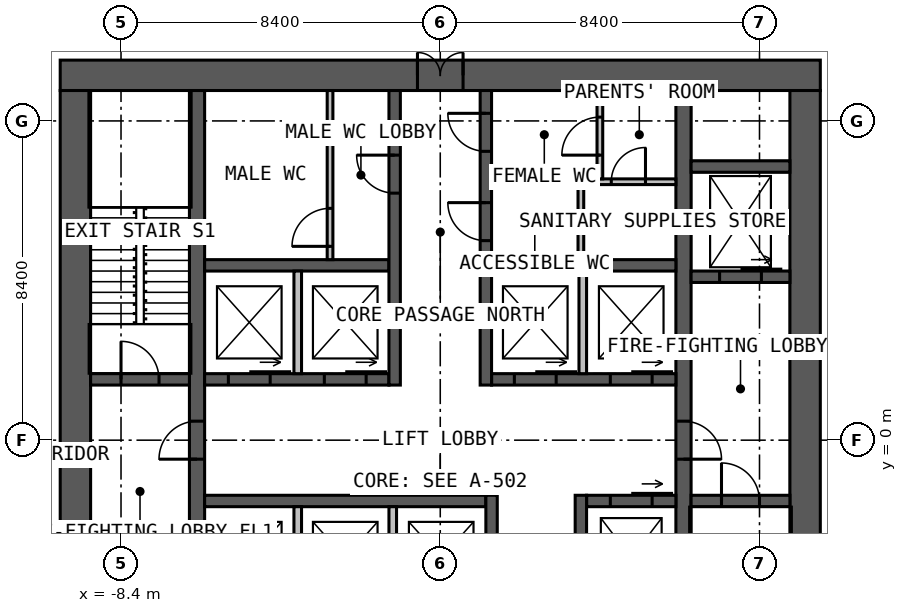
"""IFC4 building model, lengths in metres.
Left out: names, types, materials, properties, quantities, classifications, styles, units other than length and angle.
Written with IfcOpenShell. Run it as: python <this file> out.ifc"""

import sys

from ifc_helpers import new_model, si_unit, direction, frame, frame_2d, origin, place, context, subcontext, project, spatial, rectangle, extrude, element, fill, save


model = new_model("IFC4")
c1 = context("Model", 3, precision=1e-05, world=origin(), true_north=direction((0.0, 1.0)))
c2 = subcontext(c1, "Body", "Model", "MODEL_VIEW")
j1 = project(units=[si_unit("LENGTHUNIT", "METRE"), si_unit("PLANEANGLEUNIT", "RADIAN")], contexts=[c1])
p1 = place(None, origin())
s1 = spatial("IfcSite", under=j1, at=p1, CompositionType="ELEMENT")
p2 = place(p1, origin())
s2 = spatial("IfcBuilding", under=s1, at=p2, CompositionType="ELEMENT")
p3 = place(p2, frame((0.0, 0.0, 49.0)))
s3 = spatial("IfcBuildingStorey", under=s2, at=p3, CompositionType="ELEMENT", Elevation=49.0)
p4 = place(p3, frame((-10.0, 9.6, 0.0), z_axis=(0.0, 0.0, 1.0), x_axis=(1.0, 0.0, 0.0)))
e1 = element("IfcWall", 1, at=p4, inside=s3, PredefinedType="SOLIDWALL", context=c2, shape_type="SweptSolid", body=[
    extrude(rectangle(XDim=20.0, YDim=0.8, at=frame_2d((10.0, 0.0))), origin(), (0.0, 0.0, 1.0), 4.0),
])
p5 = place(p4, frame((9.4, 0.0, 0.0)))
e2 = element("IfcOpeningElement", 2, at=p5, cuts=e1, PredefinedType="OPENING", context=c2, shape_type="SweptSolid", body=[
    extrude(rectangle(XDim=1.2, YDim=2.2, at=frame_2d((0.6, 1.1))), frame((0.0, 0.41, 0.0), z_axis=(0.0, -1.0, 0.0), x_axis=(1.0, 0.0, 0.0)), (0.0, 0.0, 1.0), 0.82),
])
for number, where, z_axis, x_axis in (
    (3, (9.6, -9.2, 0.0), (0.0, 0.0, 1.0), (0.0, 1.0, 0.0)),
    (4, (-9.6, 9.2, 0.0), (0.0, 0.0, 1.0), (0.0, -1.0, 0.0)),
):
    element("IfcWall", number, at=place(p3, frame(where, z_axis=z_axis, x_axis=x_axis)), inside=s3, PredefinedType="SOLIDWALL", context=c2, shape_type="SweptSolid", body=[
        extrude(rectangle(XDim=18.4, YDim=0.8, at=frame_2d((9.2, 0.0))), origin(), (0.0, 0.0, 1.0), 4.0),
    ])
p6 = place(p3, frame((-6.4, -9.2, 0.0), z_axis=(0.0, 0.0, 1.0), x_axis=(0.0, 1.0, 0.0)))
e5 = element("IfcWall", 5, at=p6, inside=s3, PredefinedType="SOLIDWALL", context=c2, shape_type="SweptSolid", body=[
    extrude(rectangle(XDim=18.4, YDim=0.4, at=frame_2d((9.2, 0.0))), origin(), (0.0, 0.0, 1.0), 4.0),
])
p7 = place(p6, frame((8.7, 0.0, 0.0)))
e6 = element("IfcOpeningElement", 6, at=p7, cuts=e5, PredefinedType="OPENING", context=c2, shape_type="SweptSolid", body=[
    extrude(rectangle(XDim=1.0, YDim=2.2, at=frame_2d((0.5, 1.1))), frame((0.0, 0.21, 0.0), z_axis=(0.0, -1.0, 0.0), x_axis=(1.0, 0.0, 0.0)), (0.0, 0.0, 1.0), 0.42),
])
p8 = place(p3, frame((6.4, 9.2, 0.0), z_axis=(0.0, 0.0, 1.0), x_axis=(0.0, -1.0, 0.0)))
e7 = element("IfcWall", 7, at=p8, inside=s3, PredefinedType="SOLIDWALL", context=c2, shape_type="SweptSolid", body=[
    extrude(rectangle(XDim=18.4, YDim=0.4, at=frame_2d((9.2, 0.0))), origin(), (0.0, 0.0, 1.0), 4.0),
])
p9 = place(p8, frame((8.7, 0.0, 0.0)))
e8 = element("IfcOpeningElement", 8, at=p9, cuts=e7, PredefinedType="OPENING", context=c2, shape_type="SweptSolid", body=[
    extrude(rectangle(XDim=1.0, YDim=2.2, at=frame_2d((0.5, 1.1))), frame((0.0, 0.21, 0.0), z_axis=(0.0, -1.0, 0.0), x_axis=(1.0, 0.0, 0.0)), (0.0, 0.0, 1.0), 0.42),
])
p10 = place(p3, frame((-6.2, 1.6, 0.0), z_axis=(0.0, 0.0, 1.0), x_axis=(1.0, 0.0, 0.0)))
e9 = element("IfcWall", 9, at=p10, inside=s3, PredefinedType="SOLIDWALL", context=c2, shape_type="SweptSolid", body=[
    extrude(rectangle(XDim=4.85, YDim=0.3, at=frame_2d((2.425, 0.0))), origin(), (0.0, 0.0, 1.0), 4.0),
])
p11 = place(p10, frame((0.625, 0.0, 0.0)))
e10 = element("IfcOpeningElement", 10, at=p11, cuts=e9, PredefinedType="OPENING", context=c2, shape_type="SweptSolid", body=[
    extrude(rectangle(XDim=1.1, YDim=2.2, at=frame_2d((0.55, 1.1))), frame((0.0, 0.16, 0.0), z_axis=(0.0, -1.0, 0.0), x_axis=(1.0, 0.0, 0.0)), (0.0, 0.0, 1.0), 0.32),
])
p12 = place(p10, frame((3.15, 0.0, 0.0)))
e11 = element("IfcOpeningElement", 11, at=p12, cuts=e9, PredefinedType="OPENING", context=c2, shape_type="SweptSolid", body=[
    extrude(rectangle(XDim=1.1, YDim=2.2, at=frame_2d((0.55, 1.1))), frame((0.0, 0.16, 0.0), z_axis=(0.0, -1.0, 0.0), x_axis=(1.0, 0.0, 0.0)), (0.0, 0.0, 1.0), 0.32),
])
p13 = place(p3, frame((1.35, 1.6, 0.0), z_axis=(0.0, 0.0, 1.0), x_axis=(1.0, 0.0, 0.0)))
e12 = element("IfcWall", 12, at=p13, inside=s3, PredefinedType="SOLIDWALL", context=c2, shape_type="SweptSolid", body=[
    extrude(rectangle(XDim=4.85, YDim=0.3, at=frame_2d((2.425, 0.0))), origin(), (0.0, 0.0, 1.0), 4.0),
])
p14 = place(p13, frame((0.6, 0.0, 0.0)))
e13 = element("IfcOpeningElement", 13, at=p14, cuts=e12, PredefinedType="OPENING", context=c2, shape_type="SweptSolid", body=[
    extrude(rectangle(XDim=1.1, YDim=2.2, at=frame_2d((0.55, 1.1))), frame((0.0, 0.16, 0.0), z_axis=(0.0, -1.0, 0.0), x_axis=(1.0, 0.0, 0.0)), (0.0, 0.0, 1.0), 0.32),
])
p15 = place(p13, frame((3.125, 0.0, 0.0)))
e14 = element("IfcOpeningElement", 14, at=p15, cuts=e12, PredefinedType="OPENING", context=c2, shape_type="SweptSolid", body=[
    extrude(rectangle(XDim=1.1, YDim=2.2, at=frame_2d((0.55, 1.1))), frame((0.0, 0.16, 0.0), z_axis=(0.0, -1.0, 0.0), x_axis=(1.0, 0.0, 0.0)), (0.0, 0.0, 1.0), 0.32),
])
for number, where, z_axis, x_axis in (
    (15, (-6.2, 4.6, 0.0), (0.0, 0.0, 1.0), (1.0, 0.0, 0.0)),
    (16, (1.35, 4.6, 0.0), (0.0, 0.0, 1.0), (1.0, 0.0, 0.0)),
):
    element("IfcWall", number, at=place(p3, frame(where, z_axis=z_axis, x_axis=x_axis)), inside=s3, PredefinedType="SOLIDWALL", context=c2, shape_type="SweptSolid", body=[
        extrude(rectangle(XDim=4.85, YDim=0.3, at=frame_2d((2.425, 0.0))), origin(), (0.0, 0.0, 1.0), 4.0),
    ])
p16 = place(p3, frame((-1.2, 1.45, 0.0), z_axis=(0.0, 0.0, 1.0), x_axis=(0.0, 1.0, 0.0)))
e17 = element("IfcWall", 17, at=p16, inside=s3, PredefinedType="SOLIDWALL", context=c2, shape_type="SweptSolid", body=[
    extrude(rectangle(XDim=7.75, YDim=0.3, at=frame_2d((3.875, 0.0))), origin(), (0.0, 0.0, 1.0), 4.0),
])
p17 = place(p16, frame((5.05, 0.0, 0.0)))
e18 = element("IfcOpeningElement", 18, at=p17, cuts=e17, PredefinedType="OPENING", context=c2, shape_type="SweptSolid", body=[
    extrude(rectangle(XDim=1.0, YDim=2.2, at=frame_2d((0.5, 1.1))), frame((0.0, 0.16, 0.0), z_axis=(0.0, -1.0, 0.0), x_axis=(1.0, 0.0, 0.0)), (0.0, 0.0, 1.0), 0.32),
])
p18 = place(p3, frame((1.2, 1.45, 0.0), z_axis=(0.0, 0.0, 1.0), x_axis=(0.0, 1.0, 0.0)))
e19 = element("IfcWall", 19, at=p18, inside=s3, PredefinedType="SOLIDWALL", context=c2, shape_type="SweptSolid", body=[
    extrude(rectangle(XDim=7.75, YDim=0.3, at=frame_2d((3.875, 0.0))), origin(), (0.0, 0.0, 1.0), 4.0),
])
p19 = place(p18, frame((3.8, 0.0, 0.0)))
e20 = element("IfcOpeningElement", 20, at=p19, cuts=e19, PredefinedType="OPENING", context=c2, shape_type="SweptSolid", body=[
    extrude(rectangle(XDim=1.0, YDim=2.2, at=frame_2d((0.5, 1.1))), frame((0.0, 0.16, 0.0), z_axis=(0.0, -1.0, 0.0), x_axis=(1.0, 0.0, 0.0)), (0.0, 0.0, 1.0), 0.32),
])
p20 = place(p18, frame((6.15, 0.0, 0.0)))
e21 = element("IfcOpeningElement", 21, at=p20, cuts=e19, PredefinedType="OPENING", context=c2, shape_type="SweptSolid", body=[
    extrude(rectangle(XDim=1.0, YDim=2.2, at=frame_2d((0.5, 1.1))), frame((0.0, 0.16, 0.0), z_axis=(0.0, -1.0, 0.0), x_axis=(1.0, 0.0, 0.0)), (0.0, 0.0, 1.0), 0.32),
])
p21 = place(p3, frame((-6.2, -1.6, 0.0), z_axis=(0.0, 0.0, 1.0), x_axis=(1.0, 0.0, 0.0)))
e22 = element("IfcWall", 22, at=p21, inside=s3, PredefinedType="SOLIDWALL", context=c2, shape_type="SweptSolid", body=[
    extrude(rectangle(XDim=7.4, YDim=0.3, at=frame_2d((3.7, 0.0))), origin(), (0.0, 0.0, 1.0), 4.0),
])
p22 = place(p3, frame((3.85, -1.6, 0.0), z_axis=(0.0, 0.0, 1.0), x_axis=(1.0, 0.0, 0.0)))
e23 = element("IfcWall", 23, at=p22, inside=s3, PredefinedType="SOLIDWALL", context=c2, shape_type="SweptSolid", body=[
    extrude(rectangle(XDim=2.35, YDim=0.3, at=frame_2d((1.175, 0.0))), origin(), (0.0, 0.0, 1.0), 4.0),
])
p23 = place(p22, frame((0.625, 0.0, 0.0)))
e24 = element("IfcOpeningElement", 24, at=p23, cuts=e23, PredefinedType="OPENING", context=c2, shape_type="SweptSolid", body=[
    extrude(rectangle(XDim=1.1, YDim=2.2, at=frame_2d((0.55, 1.1))), frame((0.0, 0.16, 0.0), z_axis=(0.0, -1.0, 0.0), x_axis=(1.0, 0.0, 0.0)), (0.0, 0.0, 1.0), 0.32),
])
p24 = place(p3, frame((1.35, -1.45, 0.0), z_axis=(0.0, 0.0, 1.0), x_axis=(0.0, -1.0, 0.0)))
e25 = element("IfcWall", 25, at=p24, inside=s3, PredefinedType="SOLIDWALL", context=c2, shape_type="SweptSolid", body=[
    extrude(rectangle(XDim=7.75, YDim=0.3, at=frame_2d((3.875, 0.0))), origin(), (0.0, 0.0, 1.0), 4.0),
])
p25 = place(p24, frame((5.8, 0.0, 0.0)))
e26 = element("IfcOpeningElement", 26, at=p25, cuts=e25, PredefinedType="OPENING", context=c2, shape_type="SweptSolid", body=[
    extrude(rectangle(XDim=1.0, YDim=2.2, at=frame_2d((0.5, 1.1))), frame((0.0, 0.16, 0.0), z_axis=(0.0, -1.0, 0.0), x_axis=(1.0, 0.0, 0.0)), (0.0, 0.0, 1.0), 0.32),
])
p26 = place(p24, frame((3.525, 0.0, 0.0)))
e27 = element("IfcOpeningElement", 27, at=p26, cuts=e25, PredefinedType="OPENING", context=c2, shape_type="SweptSolid", body=[
    extrude(rectangle(XDim=0.9, YDim=2.2, at=frame_2d((0.45, 1.1))), frame((0.0, 0.16, 0.0), z_axis=(0.0, -1.0, 0.0), x_axis=(1.0, 0.0, 0.0)), (0.0, 0.0, 1.0), 0.32),
])
p27 = place(p3, frame((3.7, -1.45, 0.0), z_axis=(0.0, 0.0, 1.0), x_axis=(0.0, -1.0, 0.0)))
e28 = element("IfcWall", 28, at=p27, inside=s3, PredefinedType="SOLIDWALL", context=c2, shape_type="SweptSolid", body=[
    extrude(rectangle(XDim=7.75, YDim=0.3, at=frame_2d((3.875, 0.0))), origin(), (0.0, 0.0, 1.0), 4.0),
])
p28 = place(p27, frame((5.1, 0.0, 0.0)))
e29 = element("IfcOpeningElement", 29, at=p28, cuts=e28, PredefinedType="OPENING", context=c2, shape_type="SweptSolid", body=[
    extrude(rectangle(XDim=0.9, YDim=2.2, at=frame_2d((0.45, 1.1))), frame((0.0, 0.16, 0.0), z_axis=(0.0, -1.0, 0.0), x_axis=(1.0, 0.0, 0.0)), (0.0, 0.0, 1.0), 0.32),
])
p29 = place(p3, frame((-9.2, 1.6, 0.0), z_axis=(0.0, 0.0, 1.0), x_axis=(1.0, 0.0, 0.0)))
e30 = element("IfcWall", 30, at=p29, inside=s3, PredefinedType="SOLIDWALL", context=c2, shape_type="SweptSolid", body=[
    extrude(rectangle(XDim=2.6, YDim=0.3, at=frame_2d((1.3, 0.0))), origin(), (0.0, 0.0, 1.0), 4.0),
])
p30 = place(p29, frame((0.8, 0.0, 0.0)))
e31 = element("IfcOpeningElement", 31, at=p30, cuts=e30, PredefinedType="OPENING", context=c2, shape_type="SweptSolid", body=[
    extrude(rectangle(XDim=1.0, YDim=2.2, at=frame_2d((0.5, 1.1))), frame((0.0, 0.16, 0.0), z_axis=(0.0, -1.0, 0.0), x_axis=(1.0, 0.0, 0.0)), (0.0, 0.0, 1.0), 0.32),
])
p31 = place(p3, frame((6.6, -1.6, 0.0), z_axis=(0.0, 0.0, 1.0), x_axis=(1.0, 0.0, 0.0)))
e32 = element("IfcWall", 32, at=p31, inside=s3, PredefinedType="SOLIDWALL", context=c2, shape_type="SweptSolid", body=[
    extrude(rectangle(XDim=2.6, YDim=0.3, at=frame_2d((1.3, 0.0))), origin(), (0.0, 0.0, 1.0), 4.0),
])
p32 = place(p31, frame((0.8, 0.0, 0.0)))
e33 = element("IfcOpeningElement", 33, at=p32, cuts=e32, PredefinedType="OPENING", context=c2, shape_type="SweptSolid", body=[
    extrude(rectangle(XDim=1.0, YDim=2.2, at=frame_2d((0.5, 1.1))), frame((0.0, 0.16, 0.0), z_axis=(0.0, -1.0, 0.0), x_axis=(1.0, 0.0, 0.0)), (0.0, 0.0, 1.0), 0.32),
])
p33 = place(p3, frame((6.6, 4.3, 0.0), z_axis=(0.0, 0.0, 1.0), x_axis=(1.0, 0.0, 0.0)))
e34 = element("IfcWall", 34, at=p33, inside=s3, PredefinedType="SOLIDWALL", context=c2, shape_type="SweptSolid", body=[
    extrude(rectangle(XDim=2.6, YDim=0.3, at=frame_2d((1.3, 0.0))), origin(), (0.0, 0.0, 1.0), 4.0),
])
p34 = place(p33, frame((0.75, 0.0, 0.0)))
e35 = element("IfcOpeningElement", 35, at=p34, cuts=e34, PredefinedType="OPENING", context=c2, shape_type="SweptSolid", body=[
    extrude(rectangle(XDim=1.1, YDim=2.2, at=frame_2d((0.55, 1.1))), frame((0.0, 0.16, 0.0), z_axis=(0.0, -1.0, 0.0), x_axis=(1.0, 0.0, 0.0)), (0.0, 0.0, 1.0), 0.32),
])
p35 = place(p3, frame((6.6, 7.2, 0.0), z_axis=(0.0, 0.0, 1.0), x_axis=(1.0, 0.0, 0.0)))
e36 = element("IfcWall", 36, at=p35, inside=s3, PredefinedType="SOLIDWALL", context=c2, shape_type="SweptSolid", body=[
    extrude(rectangle(XDim=2.6, YDim=0.3, at=frame_2d((1.3, 0.0))), origin(), (0.0, 0.0, 1.0), 4.0),
])
for number, where, z_axis, x_axis in (
    (37, (-3.75, 1.75, 0.0), (0.0, 0.0, 1.0), (0.0, 1.0, 0.0)),
    (38, (3.75, 1.75, 0.0), (0.0, 0.0, 1.0), (0.0, 1.0, 0.0)),
    (39, (-3.75, -1.75, 0.0), (0.0, 0.0, 1.0), (0.0, -1.0, 0.0)),
    (40, (-1.25, -1.75, 0.0), (0.0, 0.0, 1.0), (0.0, -1.0, 0.0)),
):
    element("IfcWall", number, at=place(p3, frame(where, z_axis=z_axis, x_axis=x_axis)), inside=s3, PredefinedType="SOLIDWALL", context=c2, shape_type="SweptSolid", body=[
        extrude(rectangle(XDim=2.7, YDim=0.2, at=frame_2d((1.35, 0.0))), origin(), (0.0, 0.0, 1.0), 3.75),
    ])
p36 = place(p3, frame((1.35, 6.8, 0.0), z_axis=(0.0, 0.0, 1.0), x_axis=(1.0, 0.0, 0.0)))
e41 = element("IfcWall", 41, at=p36, inside=s3, PredefinedType="PARTITIONING", context=c2, shape_type="SweptSolid", body=[
    extrude(rectangle(XDim=4.85, YDim=0.15, at=frame_2d((2.425, 0.0))), origin(), (0.0, 0.0, 1.0), 3.75),
])
p37 = place(p36, frame((3.15, 0.0, 0.0)))
e42 = element("IfcOpeningElement", 42, at=p37, cuts=e41, PredefinedType="OPENING", context=c2, shape_type="SweptSolid", body=[
    extrude(rectangle(XDim=0.9, YDim=2.2, at=frame_2d((0.45, 1.1))), frame((0.0, 0.085, 0.0), z_axis=(0.0, -1.0, 0.0), x_axis=(1.0, 0.0, 0.0)), (0.0, 0.0, 1.0), 0.17),
])
p38 = place(p3, frame((3.7, 4.75, 0.0), z_axis=(0.0, 0.0, 1.0), x_axis=(0.0, 1.0, 0.0)))
e43 = element("IfcWall", 43, at=p38, inside=s3, PredefinedType="PARTITIONING", context=c2, shape_type="SweptSolid", body=[
    extrude(rectangle(XDim=1.975, YDim=0.15, at=frame_2d((0.988, 0.0))), origin(), (0.0, 0.0, 1.0), 3.75),
])
p39 = place(p3, frame((4.2, 6.875, 0.0), z_axis=(0.0, 0.0, 1.0), x_axis=(0.0, 1.0, 0.0)))
e44 = element("IfcWall", 44, at=p39, inside=s3, PredefinedType="PARTITIONING", context=c2, shape_type="SweptSolid", body=[
    extrude(rectangle(XDim=2.325, YDim=0.15, at=frame_2d((1.163, 0.0))), origin(), (0.0, 0.0, 1.0), 3.75),
])
p40 = place(p39, frame((0.625, 0.0, 0.0)))
e45 = element("IfcOpeningElement", 45, at=p40, cuts=e44, PredefinedType="OPENING", context=c2, shape_type="SweptSolid", body=[
    extrude(rectangle(XDim=1.0, YDim=2.2, at=frame_2d((0.5, 1.1))), frame((0.0, 0.085, 0.0), z_axis=(0.0, -1.0, 0.0), x_axis=(1.0, 0.0, 0.0)), (0.0, 0.0, 1.0), 0.17),
])
p41 = place(p3, frame((-2.9, 4.75, 0.0), z_axis=(0.0, 0.0, 1.0), x_axis=(0.0, 1.0, 0.0)))
e46 = element("IfcWall", 46, at=p41, inside=s3, PredefinedType="PARTITIONING", context=c2, shape_type="SweptSolid", body=[
    extrude(rectangle(XDim=4.45, YDim=0.15, at=frame_2d((2.225, 0.0))), origin(), (0.0, 0.0, 1.0), 3.75),
])
p42 = place(p41, frame((0.35, 0.0, 0.0)))
e47 = element("IfcOpeningElement", 47, at=p42, cuts=e46, PredefinedType="OPENING", context=c2, shape_type="SweptSolid", body=[
    extrude(rectangle(XDim=1.0, YDim=2.2, at=frame_2d((0.5, 1.1))), frame((0.0, 0.085, 0.0), z_axis=(0.0, -1.0, 0.0), x_axis=(1.0, 0.0, 0.0)), (0.0, 0.0, 1.0), 0.17),
])
p43 = place(p5, origin())
e48 = element("IfcDoor", 48, at=p43, inside=s3, OperationType="DOUBLE_DOOR_SINGLE_SWING", PredefinedType="DOOR", context=c2, shape_type="SweptSolid", body=[
    extrude(rectangle(XDim=1.2, YDim=2.2, at=frame_2d((0.6, 1.1))), frame((0.0, 0.025, 0.0), z_axis=(0.0, -1.0, 0.0), x_axis=(1.0, 0.0, 0.0)), (0.0, 0.0, 1.0), 0.05),
])
fill(e2, e48)
p44 = place(p7, origin())
e49 = element("IfcDoor", 49, at=p44, inside=s3, OperationType="SINGLE_SWING_LEFT", PredefinedType="DOOR", context=c2, shape_type="SweptSolid", body=[
    extrude(rectangle(XDim=1.0, YDim=2.2, at=frame_2d((0.5, 1.1))), frame((0.0, 0.025, 0.0), z_axis=(0.0, -1.0, 0.0), x_axis=(1.0, 0.0, 0.0)), (0.0, 0.0, 1.0), 0.05),
])
fill(e6, e49)
p45 = place(p9, origin())
e50 = element("IfcDoor", 50, at=p45, inside=s3, OperationType="SINGLE_SWING_RIGHT", PredefinedType="DOOR", context=c2, shape_type="SweptSolid", body=[
    extrude(rectangle(XDim=1.0, YDim=2.2, at=frame_2d((0.5, 1.1))), frame((0.0, 0.025, 0.0), z_axis=(0.0, -1.0, 0.0), x_axis=(1.0, 0.0, 0.0)), (0.0, 0.0, 1.0), 0.05),
])
fill(e8, e50)
p46 = place(p30, origin())
e51 = element("IfcDoor", 51, at=p46, inside=s3, OperationType="SINGLE_SWING_LEFT", PredefinedType="DOOR", context=c2, shape_type="SweptSolid", body=[
    extrude(rectangle(XDim=1.0, YDim=2.2, at=frame_2d((0.5, 1.1))), frame((0.0, 0.025, 0.0), z_axis=(0.0, -1.0, 0.0), x_axis=(1.0, 0.0, 0.0)), (0.0, 0.0, 1.0), 0.05),
])
fill(e31, e51)
p47 = place(p32, origin())
e52 = element("IfcDoor", 52, at=p47, inside=s3, OperationType="SINGLE_SWING_LEFT", PredefinedType="DOOR", context=c2, shape_type="SweptSolid", body=[
    extrude(rectangle(XDim=1.0, YDim=2.2, at=frame_2d((0.5, 1.1))), frame((0.0, 0.025, 0.0), z_axis=(0.0, -1.0, 0.0), x_axis=(1.0, 0.0, 0.0)), (0.0, 0.0, 1.0), 0.05),
])
fill(e33, e52)
p48 = place(p17, origin())
e53 = element("IfcDoor", 53, at=p48, inside=s3, OperationType="SINGLE_SWING_RIGHT", PredefinedType="DOOR", context=c2, shape_type="SweptSolid", body=[
    extrude(rectangle(XDim=1.0, YDim=2.2, at=frame_2d((0.5, 1.1))), frame((0.0, 0.025, 0.0), z_axis=(0.0, -1.0, 0.0), x_axis=(1.0, 0.0, 0.0)), (0.0, 0.0, 1.0), 0.05),
])
fill(e18, e53)
p49 = place(p19, origin())
e54 = element("IfcDoor", 54, at=p49, inside=s3, OperationType="SINGLE_SWING_RIGHT", PredefinedType="DOOR", context=c2, shape_type="SweptSolid", body=[
    extrude(rectangle(XDim=1.0, YDim=2.2, at=frame_2d((0.5, 1.1))), frame((0.0, 0.025, 0.0), z_axis=(0.0, -1.0, 0.0), x_axis=(1.0, 0.0, 0.0)), (0.0, 0.0, 1.0), 0.05),
])
fill(e20, e54)
p50 = place(p20, origin())
e55 = element("IfcDoor", 55, at=p50, inside=s3, OperationType="SINGLE_SWING_RIGHT", PredefinedType="DOOR", context=c2, shape_type="SweptSolid", body=[
    extrude(rectangle(XDim=1.0, YDim=2.2, at=frame_2d((0.5, 1.1))), frame((0.0, 0.025, 0.0), z_axis=(0.0, -1.0, 0.0), x_axis=(1.0, 0.0, 0.0)), (0.0, 0.0, 1.0), 0.05),
])
fill(e21, e55)
p51 = place(p37, origin())
e56 = element("IfcDoor", 56, at=p51, inside=s3, OperationType="SINGLE_SWING_RIGHT", PredefinedType="DOOR", context=c2, shape_type="SweptSolid", body=[
    extrude(rectangle(XDim=0.9, YDim=2.2, at=frame_2d((0.45, 1.1))), frame((0.0, 0.025, 0.0), z_axis=(0.0, -1.0, 0.0), x_axis=(1.0, 0.0, 0.0)), (0.0, 0.0, 1.0), 0.05),
])
fill(e42, e56)
p52 = place(p40, origin())
e57 = element("IfcDoor", 57, at=p52, inside=s3, OperationType="SINGLE_SWING_LEFT", PredefinedType="DOOR", context=c2, shape_type="SweptSolid", body=[
    extrude(rectangle(XDim=1.0, YDim=2.2, at=frame_2d((0.5, 1.1))), frame((0.0, 0.025, 0.0), z_axis=(0.0, -1.0, 0.0), x_axis=(1.0, 0.0, 0.0)), (0.0, 0.0, 1.0), 0.05),
])
fill(e45, e57)
p53 = place(p42, origin())
e58 = element("IfcDoor", 58, at=p53, inside=s3, OperationType="SINGLE_SWING_LEFT", PredefinedType="DOOR", context=c2, shape_type="SweptSolid", body=[
    extrude(rectangle(XDim=1.0, YDim=2.2, at=frame_2d((0.5, 1.1))), frame((0.0, 0.025, 0.0), z_axis=(0.0, -1.0, 0.0), x_axis=(1.0, 0.0, 0.0)), (0.0, 0.0, 1.0), 0.05),
])
fill(e47, e58)
p54 = place(p11, origin())
e59 = element("IfcDoor", 59, at=p54, inside=s3, OperationType="SLIDING_TO_LEFT", PredefinedType="DOOR", context=c2, shape_type="SweptSolid", body=[
    extrude(rectangle(XDim=1.1, YDim=2.2, at=frame_2d((0.55, 1.1))), frame((0.0, 0.025, 0.0), z_axis=(0.0, -1.0, 0.0), x_axis=(1.0, 0.0, 0.0)), (0.0, 0.0, 1.0), 0.05),
])
fill(e10, e59)
p55 = place(p12, origin())
e60 = element("IfcDoor", 60, at=p55, inside=s3, OperationType="SLIDING_TO_LEFT", PredefinedType="DOOR", context=c2, shape_type="SweptSolid", body=[
    extrude(rectangle(XDim=1.1, YDim=2.2, at=frame_2d((0.55, 1.1))), frame((0.0, 0.025, 0.0), z_axis=(0.0, -1.0, 0.0), x_axis=(1.0, 0.0, 0.0)), (0.0, 0.0, 1.0), 0.05),
])
fill(e11, e60)
p56 = place(p14, origin())
e61 = element("IfcDoor", 61, at=p56, inside=s3, OperationType="SLIDING_TO_LEFT", PredefinedType="DOOR", context=c2, shape_type="SweptSolid", body=[
    extrude(rectangle(XDim=1.1, YDim=2.2, at=frame_2d((0.55, 1.1))), frame((0.0, 0.025, 0.0), z_axis=(0.0, -1.0, 0.0), x_axis=(1.0, 0.0, 0.0)), (0.0, 0.0, 1.0), 0.05),
])
fill(e13, e61)
p57 = place(p15, origin())
e62 = element("IfcDoor", 62, at=p57, inside=s3, OperationType="SLIDING_TO_LEFT", PredefinedType="DOOR", context=c2, shape_type="SweptSolid", body=[
    extrude(rectangle(XDim=1.1, YDim=2.2, at=frame_2d((0.55, 1.1))), frame((0.0, 0.025, 0.0), z_axis=(0.0, -1.0, 0.0), x_axis=(1.0, 0.0, 0.0)), (0.0, 0.0, 1.0), 0.05),
])
fill(e14, e62)
p58 = place(p23, origin())
e63 = element("IfcDoor", 63, at=p58, inside=s3, OperationType="SLIDING_TO_LEFT", PredefinedType="DOOR", context=c2, shape_type="SweptSolid", body=[
    extrude(rectangle(XDim=1.1, YDim=2.2, at=frame_2d((0.55, 1.1))), frame((0.0, 0.025, 0.0), z_axis=(0.0, -1.0, 0.0), x_axis=(1.0, 0.0, 0.0)), (0.0, 0.0, 1.0), 0.05),
])
fill(e24, e63)
p59 = place(p34, origin())
e64 = element("IfcDoor", 64, at=p59, inside=s3, OperationType="SLIDING_TO_LEFT", PredefinedType="DOOR", context=c2, shape_type="SweptSolid", body=[
    extrude(rectangle(XDim=1.1, YDim=2.2, at=frame_2d((0.55, 1.1))), frame((0.0, 0.025, 0.0), z_axis=(0.0, -1.0, 0.0), x_axis=(1.0, 0.0, 0.0)), (0.0, 0.0, 1.0), 0.05),
])
fill(e35, e64)
save(model, sys.argv[1])
